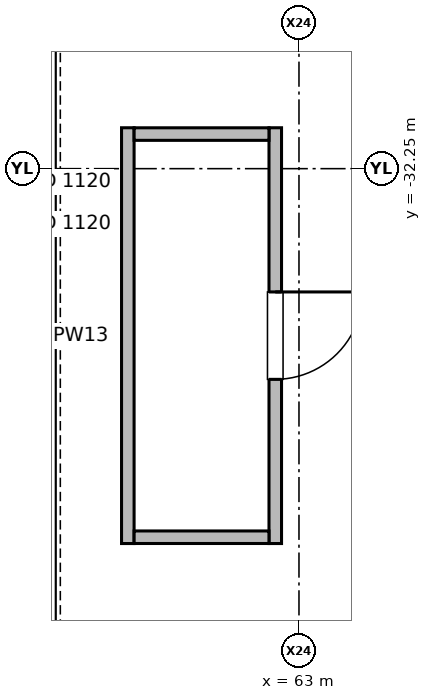
"""IFC4 building model, lengths in metres.
Left out: names, types, materials, properties, quantities, classifications, styles, units other than length and angle.
Written with IfcOpenShell. Run it as: python <this file> out.ifc"""

import sys

from ifc_helpers import new_model, si_unit, direction, frame, frame_2d, origin, place, context, subcontext, project, spatial, rectangle, extrude, element, fill, save


model = new_model("IFC4")
c1 = context("Model", 3, precision=1e-05, world=origin(), true_north=direction((0.0, 1.0)))
c2 = subcontext(c1, "Body", "Model", "MODEL_VIEW")
j1 = project(units=[si_unit("LENGTHUNIT", "METRE"), si_unit("PLANEANGLEUNIT", "RADIAN")], contexts=[c1])
p1 = place(None, origin())
s1 = spatial("IfcSite", under=j1, at=p1, CompositionType="ELEMENT")
p2 = place(p1, origin())
s2 = spatial("IfcBuilding", under=s1, at=p2, CompositionType="ELEMENT")
p3 = place(p2, frame((0.0, 0.0, 11.4)))
s3 = spatial("IfcBuildingStorey", under=s2, at=p3, CompositionType="ELEMENT", Elevation=11.4)
p4 = place(p3, frame((62.688, -31.712, 0.0), z_axis=(0.0, 0.0, 1.0), x_axis=(0.0, -1.0, 0.0)))
e1 = element("IfcWall", 1, at=p4, inside=s3, PredefinedType="PARTITIONING", context=c2, shape_type="SweptSolid", body=[
    extrude(rectangle(XDim=5.47, YDim=0.165, at=frame_2d((2.735, 0.0))), origin(), (0.0, 0.0, 1.0), 3.82),
])
p5 = place(p4, frame((2.16, 0.0, 0.0)))
e2 = element("IfcOpeningElement", 2, at=p5, cuts=e1, PredefinedType="OPENING", context=c2, shape_type="SweptSolid", body=[
    extrude(rectangle(XDim=1.15, YDim=2.2, at=frame_2d((0.575, 1.1))), frame((0.0, 0.093, 0.0), z_axis=(0.0, -1.0, 0.0), x_axis=(1.0, 0.0, 0.0)), (0.0, 0.0, 1.0), 0.185),
])
p6 = place(p3, frame((60.748, -37.182, 0.0), z_axis=(0.0, 0.0, 1.0), x_axis=(0.0, 1.0, 0.0)))
e3 = element("IfcWall", 3, at=p6, inside=s3, PredefinedType="PARTITIONING", context=c2, shape_type="SweptSolid", body=[
    extrude(rectangle(XDim=5.47, YDim=0.165, at=frame_2d((2.735, 0.0))), origin(), (0.0, 0.0, 1.0), 3.82),
])
for number, where, z_axis, x_axis in (
    (4, (60.831, -37.099, 0.0), (0.0, 0.0, 1.0), (1.0, 0.0, 0.0)),
    (5, (60.831, -31.795, 0.0), (0.0, 0.0, 1.0), (1.0, 0.0, 0.0)),
):
    element("IfcWall", number, at=place(p3, frame(where, z_axis=z_axis, x_axis=x_axis)), inside=s3, PredefinedType="PARTITIONING", context=c2, shape_type="SweptSolid", body=[
        extrude(rectangle(XDim=1.774, YDim=0.165, at=frame_2d((0.887, 0.0))), origin(), (0.0, 0.0, 1.0), 3.82),
    ])
p7 = place(p5, origin())
e6 = element("IfcDoor", 6, at=p7, inside=s3, OperationType="SINGLE_SWING_LEFT", PredefinedType="DOOR", context=c2, shape_type="SweptSolid", body=[
    extrude(rectangle(XDim=1.15, YDim=2.2, at=frame_2d((0.575, 1.1))), frame((0.0, 0.025, 0.0), z_axis=(0.0, -1.0, 0.0), x_axis=(1.0, 0.0, 0.0)), (0.0, 0.0, 1.0), 0.05),
])
fill(e2, e6)
save(model, sys.argv[1])
